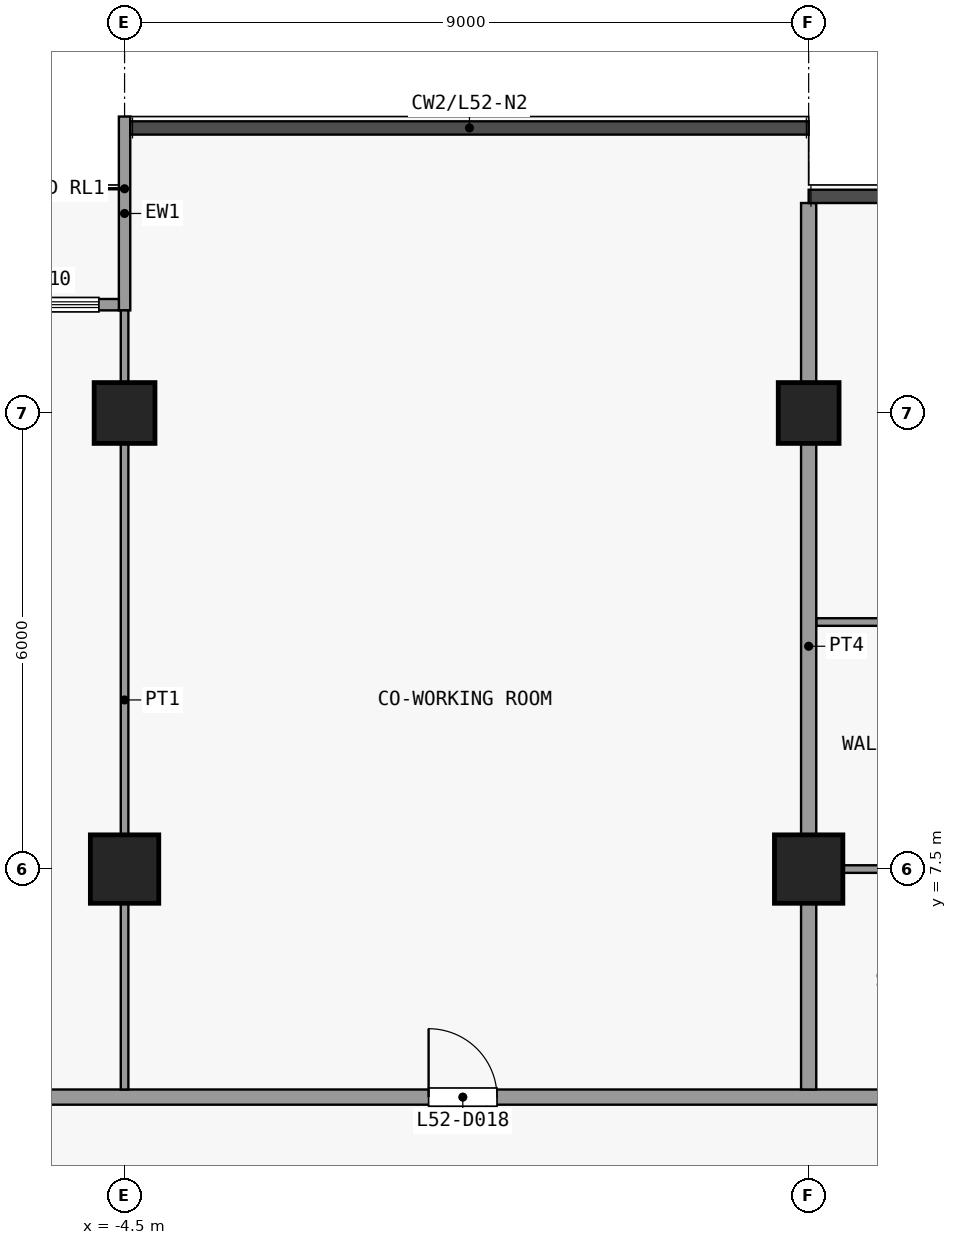
"""IFC4 building model, lengths in metres.
Left out: names, types, materials, properties, quantities, classifications, styles, units other than length and angle.
Written with IfcOpenShell. Run it as: python <this file> out.ifc"""

import sys

from ifc_helpers import new_model, si_unit, direction, frame, frame_2d, origin, origin_2d, place, context, subcontext, project, spatial, rectangle, extrude, element, fill, save


model = new_model("IFC4")
c1 = context("Model", 3, precision=1e-05, world=origin(), true_north=direction((0.0, 1.0)))
c2 = subcontext(c1, "Body", "Model", "MODEL_VIEW")
j1 = project(units=[si_unit("LENGTHUNIT", "METRE"), si_unit("PLANEANGLEUNIT", "RADIAN")], contexts=[c1])
p1 = place(None, origin())
s1 = spatial("IfcSite", under=j1, at=p1, CompositionType="ELEMENT")
p2 = place(p1, origin())
s2 = spatial("IfcBuilding", under=s1, at=p2, CompositionType="ELEMENT")
p3 = place(p2, frame((0.0, 0.0, 208.7)))
s3 = spatial("IfcBuildingStorey", under=s2, at=p3, CompositionType="ELEMENT", Elevation=208.7)
p4 = place(p3, frame((-4.5, 7.5, 0.0), z_axis=(0.0, 0.0, 1.0), x_axis=(1.0, 0.0, 0.0)))
e1 = element("IfcColumn", 1, at=p4, inside=s3, PredefinedType="COLUMN", context=c2, shape_type="SweptSolid", body=[
    extrude(rectangle(XDim=0.9, YDim=0.9, at=origin_2d()), origin(), (0.0, 0.0, 1.0), 3.6),
])
p5 = place(p3, frame((-4.5, 13.5, 0.0), z_axis=(0.0, 0.0, 1.0), x_axis=(1.0, 0.0, 0.0)))
e2 = element("IfcColumn", 2, at=p5, inside=s3, PredefinedType="COLUMN", context=c2, shape_type="SweptSolid", body=[
    extrude(rectangle(XDim=0.8, YDim=0.8, at=origin_2d()), origin(), (0.0, 0.0, 1.0), 3.6),
])
p6 = place(p3, frame((4.5, 7.5, 0.0), z_axis=(0.0, 0.0, 1.0), x_axis=(1.0, 0.0, 0.0)))
e3 = element("IfcColumn", 3, at=p6, inside=s3, PredefinedType="COLUMN", context=c2, shape_type="SweptSolid", body=[
    extrude(rectangle(XDim=0.9, YDim=0.9, at=origin_2d()), origin(), (0.0, 0.0, 1.0), 3.6),
])
p7 = place(p3, frame((4.5, 13.5, 0.0), z_axis=(0.0, 0.0, 1.0), x_axis=(1.0, 0.0, 0.0)))
e4 = element("IfcColumn", 4, at=p7, inside=s3, PredefinedType="COLUMN", context=c2, shape_type="SweptSolid", body=[
    extrude(rectangle(XDim=0.8, YDim=0.8, at=origin_2d()), origin(), (0.0, 0.0, 1.0), 3.6),
])
p8 = place(p3, frame((-4.5, 14.85, 0.0), z_axis=(0.0, 0.0, 1.0), x_axis=(0.0, 1.0, 0.0)))
e5 = element("IfcWall", 5, at=p8, inside=s3, PredefinedType="SOLIDWALL", context=c2, shape_type="SweptSolid", body=[
    extrude(rectangle(XDim=2.55, YDim=0.15, at=frame_2d((1.275, 0.0))), origin(), (0.0, 0.0, 1.0), 3.3),
])
p9 = place(p3, frame((-10.425, 14.925, 0.0), z_axis=(0.0, 0.0, 1.0), x_axis=(1.0, 0.0, 0.0)))
e6 = element("IfcWall", 6, at=p9, inside=s3, PredefinedType="SOLIDWALL", context=c2, shape_type="SweptSolid", body=[
    extrude(rectangle(XDim=5.85, YDim=0.15, at=frame_2d((2.925, 0.0))), origin(), (0.0, 0.0, 1.0), 3.3),
])
p10 = place(p9, frame((2.325, 0.0, 0.0)))
e7 = element("IfcOpeningElement", 7, at=p10, cuts=e6, PredefinedType="OPENING", context=c2, shape_type="SweptSolid", body=[
    extrude(rectangle(XDim=1.2, YDim=2.4, at=frame_2d((0.6, 1.2))), frame((0.0, 0.085, 0.0), z_axis=(0.0, -1.0, 0.0), x_axis=(1.0, 0.0, 0.0)), (0.0, 0.0, 1.0), 0.17),
])
p11 = place(p9, frame((0.262, 0.0, 0.9)))
e8 = element("IfcOpeningElement", 8, at=p11, cuts=e6, PredefinedType="OPENING", context=c2, shape_type="SweptSolid", body=[
    extrude(rectangle(XDim=1.8, YDim=2.1, at=frame_2d((0.9, 1.05))), frame((0.0, 0.085, 0.0), z_axis=(0.0, -1.0, 0.0), x_axis=(1.0, 0.0, 0.0)), (0.0, 0.0, 1.0), 0.17),
])
p12 = place(p9, frame((3.788, 0.0, 0.9)))
e9 = element("IfcOpeningElement", 9, at=p12, cuts=e6, PredefinedType="OPENING", context=c2, shape_type="SweptSolid", body=[
    extrude(rectangle(XDim=1.8, YDim=2.1, at=frame_2d((0.9, 1.05))), frame((0.0, 0.085, 0.0), z_axis=(0.0, -1.0, 0.0), x_axis=(1.0, 0.0, 0.0)), (0.0, 0.0, 1.0), 0.17),
])
p13 = place(p3, frame((-17.85, 4.5, 0.0), z_axis=(0.0, 0.0, 1.0), x_axis=(1.0, 0.0, 0.0)))
e10 = element("IfcWall", 10, at=p13, inside=s3, PredefinedType="PARTITIONING", context=c2, shape_type="SweptSolid", body=[
    extrude(rectangle(XDim=38.1, YDim=0.2, at=frame_2d((19.05, 0.0))), origin(), (0.0, 0.0, 1.0), 3.3),
])
p14 = place(p13, frame((3.05, 0.0, 0.0)))
e11 = element("IfcOpeningElement", 11, at=p14, cuts=e10, PredefinedType="OPENING", context=c2, shape_type="SweptSolid", body=[
    extrude(rectangle(XDim=1.0, YDim=2.1, at=frame_2d((0.5, 1.05))), frame((0.0, 0.11, 0.0), z_axis=(0.0, -1.0, 0.0), x_axis=(1.0, 0.0, 0.0)), (0.0, 0.0, 1.0), 0.22),
])
p15 = place(p13, frame((9.85, 0.0, 0.0)))
e12 = element("IfcOpeningElement", 12, at=p15, cuts=e10, PredefinedType="OPENING", context=c2, shape_type="SweptSolid", body=[
    extrude(rectangle(XDim=0.9, YDim=2.1, at=frame_2d((0.45, 1.05))), frame((0.0, 0.11, 0.0), z_axis=(0.0, -1.0, 0.0), x_axis=(1.0, 0.0, 0.0)), (0.0, 0.0, 1.0), 0.22),
])
p16 = place(p13, frame((17.35, 0.0, 0.0)))
e13 = element("IfcOpeningElement", 13, at=p16, cuts=e10, PredefinedType="OPENING", context=c2, shape_type="SweptSolid", body=[
    extrude(rectangle(XDim=0.9, YDim=2.1, at=frame_2d((0.45, 1.05))), frame((0.0, 0.11, 0.0), z_axis=(0.0, -1.0, 0.0), x_axis=(1.0, 0.0, 0.0)), (0.0, 0.0, 1.0), 0.22),
])
p17 = place(p13, frame((29.05, 0.0, 0.0)))
e14 = element("IfcOpeningElement", 14, at=p17, cuts=e10, PredefinedType="OPENING", context=c2, shape_type="SweptSolid", body=[
    extrude(rectangle(XDim=1.0, YDim=2.1, at=frame_2d((0.5, 1.05))), frame((0.0, 0.11, 0.0), z_axis=(0.0, -1.0, 0.0), x_axis=(1.0, 0.0, 0.0)), (0.0, 0.0, 1.0), 0.22),
])
p18 = place(p3, frame((4.6, 7.5, 0.0), z_axis=(0.0, 0.0, 1.0), x_axis=(1.0, 0.0, 0.0)))
e15 = element("IfcWall", 15, at=p18, inside=s3, PredefinedType="PARTITIONING", context=c2, shape_type="SweptSolid", body=[
    extrude(rectangle(XDim=2.4, YDim=0.1, at=frame_2d((1.2, 0.0))), origin(), (0.0, 0.0, 1.0), 3.3),
])
p19 = place(p3, frame((4.6, 10.75, 0.0), z_axis=(0.0, 0.0, 1.0), x_axis=(1.0, 0.0, 0.0)))
e16 = element("IfcWall", 16, at=p19, inside=s3, PredefinedType="PARTITIONING", context=c2, shape_type="SweptSolid", body=[
    extrude(rectangle(XDim=3.2, YDim=0.1, at=frame_2d((1.6, 0.0))), origin(), (0.0, 0.0, 1.0), 3.3),
])
p20 = place(p19, frame((1.1, 0.0, 0.0)))
e17 = element("IfcOpeningElement", 17, at=p20, cuts=e16, PredefinedType="OPENING", context=c2, shape_type="SweptSolid", body=[
    extrude(rectangle(XDim=0.9, YDim=2.1, at=frame_2d((0.45, 1.05))), frame((0.0, 0.06, 0.0), z_axis=(0.0, -1.0, 0.0), x_axis=(1.0, 0.0, 0.0)), (0.0, 0.0, 1.0), 0.12),
])
p21 = place(p3, frame((-4.5, 4.6, 0.0), z_axis=(0.0, 0.0, 1.0), x_axis=(0.0, 1.0, 0.0)))
e18 = element("IfcWall", 18, at=p21, inside=s3, PredefinedType="PARTITIONING", context=c2, shape_type="SweptSolid", body=[
    extrude(rectangle(XDim=10.25, YDim=0.1, at=frame_2d((5.125, 0.0))), origin(), (0.0, 0.0, 1.0), 3.3),
])
p22 = place(p3, frame((4.5, 4.6, 0.0), z_axis=(0.0, 0.0, 1.0), x_axis=(0.0, 1.0, 0.0)))
e19 = element("IfcWall", 19, at=p22, inside=s3, PredefinedType="PARTITIONING", context=c2, shape_type="SweptSolid", body=[
    extrude(rectangle(XDim=11.662, YDim=0.2, at=frame_2d((5.831, 0.0))), origin(), (0.0, 0.0, 1.0), 3.3),
])
p23 = place(p12, origin())
e20 = element("IfcWindow", 20, at=p23, inside=s3, PartitioningType="SINGLE_PANEL", PredefinedType="WINDOW", context=c2, shape_type="SweptSolid", body=[
    extrude(rectangle(XDim=1.8, YDim=2.1, at=frame_2d((0.9, 1.05))), frame((0.0, 0.03, 0.0), z_axis=(0.0, -1.0, 0.0), x_axis=(1.0, 0.0, 0.0)), (0.0, 0.0, 1.0), 0.06),
])
fill(e9, e20)
p24 = place(p16, origin())
e21 = element("IfcDoor", 21, at=p24, inside=s3, OperationType="SINGLE_SWING_RIGHT", PredefinedType="DOOR", context=c2, shape_type="SweptSolid", body=[
    extrude(rectangle(XDim=0.9, YDim=2.1, at=frame_2d((0.45, 1.05))), frame((0.0, 0.025, 0.0), z_axis=(0.0, -1.0, 0.0), x_axis=(1.0, 0.0, 0.0)), (0.0, 0.0, 1.0), 0.05),
])
fill(e13, e21)
save(model, sys.argv[1])
